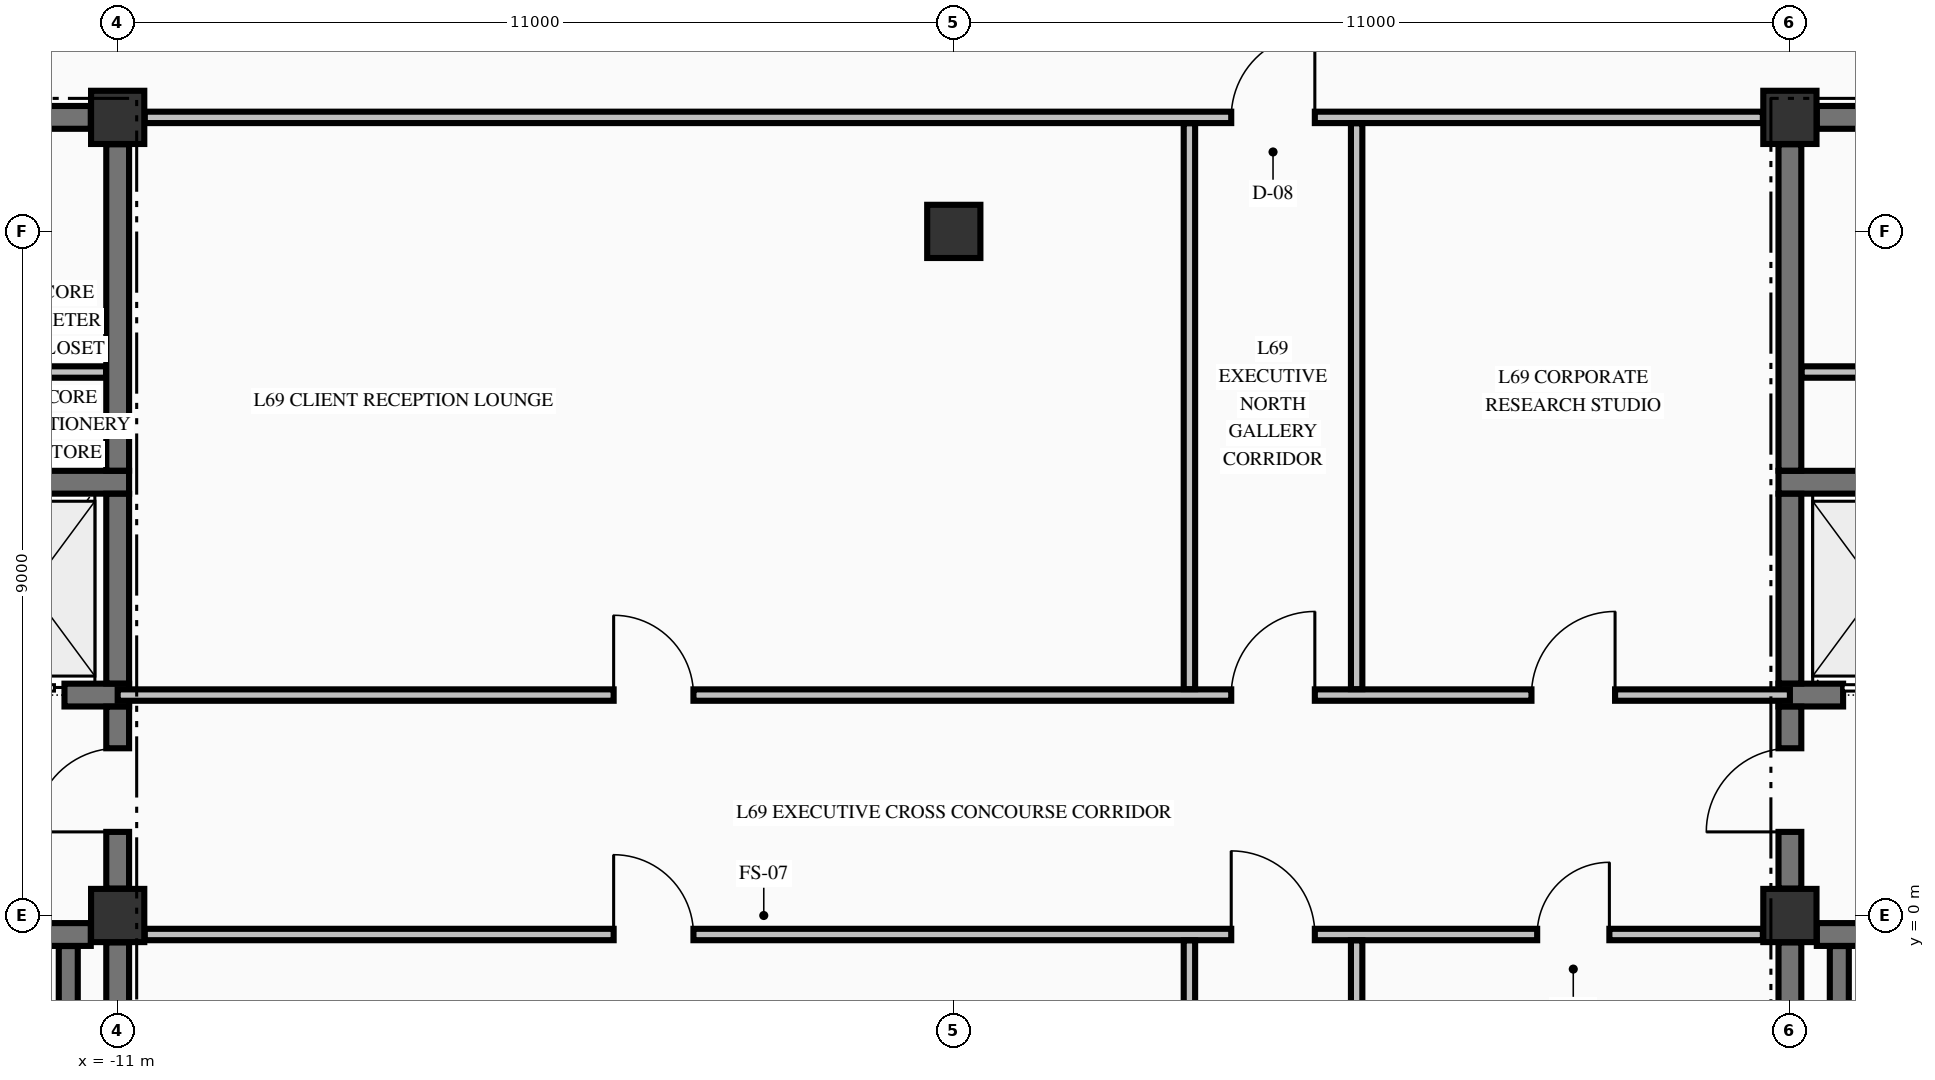
"""IFC4 building model, lengths in metres.
Left out: names, types, materials, properties, quantities, classifications, styles, units other than length and angle.
Written with IfcOpenShell. Run it as: python <this file> out.ifc"""

import sys

from ifc_helpers import new_model, si_unit, direction, frame, frame_2d, origin, origin_2d, place, context, subcontext, project, spatial, rectangle, extrude, element, fill, save


model = new_model("IFC4")
c1 = context("Model", 3, precision=1e-05, world=origin(), true_north=direction((0.0, 1.0)))
c2 = subcontext(c1, "Body", "Model", "MODEL_VIEW")
j1 = project(units=[si_unit("LENGTHUNIT", "METRE"), si_unit("PLANEANGLEUNIT", "RADIAN")], contexts=[c1])
p1 = place(None, origin())
s1 = spatial("IfcSite", under=j1, at=p1, CompositionType="ELEMENT")
p2 = place(p1, origin())
s2 = spatial("IfcBuilding", under=s1, at=p2, CompositionType="ELEMENT")
p3 = place(p2, frame((0.0, 0.0, 260.89)))
s3 = spatial("IfcBuildingStorey", under=s2, at=p3, CompositionType="ELEMENT", Elevation=260.89)
for number, where, z_axis, x_axis in (
    (1, (-11.0, 0.0, -0.25), (0.0, 0.0, 1.0), (1.0, 0.0, 0.0)),
    (2, (-11.0, 10.5, -0.25), (0.0, 0.0, 1.0), (1.0, 0.0, 0.0)),
    (3, (11.0, 0.0, -0.25), (0.0, 0.0, 1.0), (1.0, 0.0, 0.0)),
    (4, (11.0, 10.5, -0.25), (0.0, 0.0, 1.0), (1.0, 0.0, 0.0)),
    (5, (0.0, 9.0, -0.25), (0.0, 0.0, 1.0), (1.0, 0.0, 0.0)),
):
    element("IfcColumn", number, at=place(p3, frame(where, z_axis=z_axis, x_axis=x_axis)), inside=s3, PredefinedType="COLUMN", context=c2, shape_type="SweptSolid", body=[
        extrude(rectangle(XDim=0.7, YDim=0.7, at=origin_2d()), origin(), (0.0, 0.0, 1.0), 3.23),
    ])
p4 = place(p3, frame((-19.646, -0.25, 0.0), z_axis=(0.0, 0.0, 1.0), x_axis=(1.0, 0.0, 0.0)))
e6 = element("IfcWall", 6, at=p4, inside=s3, PredefinedType="SHEAR", context=c2, shape_type="SweptSolid", body=[
    extrude(rectangle(XDim=8.292, YDim=0.3, at=frame_2d((4.146, 0.0))), origin(), (0.0, 0.0, 1.0), 2.98),
])
p5 = place(p4, frame((5.946, 0.0, 0.0)))
e7 = element("IfcOpeningElement", 7, at=p5, cuts=e6, PredefinedType="OPENING", context=c2, shape_type="SweptSolid", body=[
    extrude(rectangle(XDim=1.1, YDim=2.15, at=frame_2d((0.55, 1.075))), frame((0.0, 0.16, 0.0), z_axis=(0.0, -1.0, 0.0), x_axis=(1.0, 0.0, 0.0)), (0.0, 0.0, 1.0), 0.32),
])
p6 = place(p3, frame((11.354, -0.25, 0.0), z_axis=(0.0, 0.0, 1.0), x_axis=(1.0, 0.0, 0.0)))
e8 = element("IfcWall", 8, at=p6, inside=s3, PredefinedType="SHEAR", context=c2, shape_type="SweptSolid", body=[
    extrude(rectangle(XDim=3.521, YDim=0.3, at=frame_2d((1.76, 0.0))), origin(), (0.0, 0.0, 1.0), 2.98),
])
p7 = place(p6, frame((1.246, 0.0, 0.0)))
e9 = element("IfcOpeningElement", 9, at=p7, cuts=e8, PredefinedType="OPENING", context=c2, shape_type="SweptSolid", body=[
    extrude(rectangle(XDim=1.1, YDim=2.15, at=frame_2d((0.55, 1.075))), frame((0.0, 0.16, 0.0), z_axis=(0.0, -1.0, 0.0), x_axis=(1.0, 0.0, 0.0)), (0.0, 0.0, 1.0), 0.32),
])
p8 = place(p3, frame((-14.875, 2.9, 0.0), z_axis=(0.0, 0.0, 1.0), x_axis=(1.0, 0.0, 0.0)))
e10 = element("IfcWall", 10, at=p8, inside=s3, PredefinedType="SHEAR", context=c2, shape_type="SweptSolid", body=[
    extrude(rectangle(XDim=4.025, YDim=0.3, at=frame_2d((2.012, 0.0))), origin(), (0.0, 0.0, 1.0), 2.98),
])
p9 = place(p8, frame((2.075, 0.0, 0.0)))
e11 = element("IfcOpeningElement", 11, at=p9, cuts=e10, PredefinedType="OPENING", context=c2, shape_type="SweptSolid", body=[
    extrude(rectangle(XDim=1.1, YDim=2.2, at=frame_2d((0.55, 1.1))), frame((0.0, 0.16, 0.0), z_axis=(0.0, -1.0, 0.0), x_axis=(1.0, 0.0, 0.0)), (0.0, 0.0, 1.0), 0.32),
])
p10 = place(p3, frame((10.85, 2.9, 0.0), z_axis=(0.0, 0.0, 1.0), x_axis=(1.0, 0.0, 0.0)))
e12 = element("IfcWall", 12, at=p10, inside=s3, PredefinedType="SHEAR", context=c2, shape_type="SweptSolid", body=[
    extrude(rectangle(XDim=4.025, YDim=0.3, at=frame_2d((2.012, 0.0))), origin(), (0.0, 0.0, 1.0), 2.98),
])
p11 = place(p10, frame((0.85, 0.0, 0.0)))
e13 = element("IfcOpeningElement", 13, at=p11, cuts=e12, PredefinedType="OPENING", context=c2, shape_type="SweptSolid", body=[
    extrude(rectangle(XDim=1.1, YDim=2.2, at=frame_2d((0.55, 1.1))), frame((0.0, 0.16, 0.0), z_axis=(0.0, -1.0, 0.0), x_axis=(1.0, 0.0, 0.0)), (0.0, 0.0, 1.0), 0.32),
])
for number, where, z_axis, x_axis in (
    (14, (-14.875, 5.7, 0.0), (0.0, 0.0, 1.0), (1.0, 0.0, 0.0)),
    (15, (10.85, 5.7, 0.0), (0.0, 0.0, 1.0), (1.0, 0.0, 0.0)),
):
    element("IfcWall", number, at=place(p3, frame(where, z_axis=z_axis, x_axis=x_axis)), inside=s3, PredefinedType="SHEAR", context=c2, shape_type="SweptSolid", body=[
        extrude(rectangle(XDim=4.025, YDim=0.3, at=frame_2d((2.012, 0.0))), origin(), (0.0, 0.0, 1.0), 2.98),
    ])
p12 = place(p3, frame((-14.7, 10.5, 0.0), z_axis=(0.0, 0.0, 1.0), x_axis=(1.0, 0.0, 0.0)))
e16 = element("IfcWall", 16, at=p12, inside=s3, PredefinedType="SHEAR", context=c2, shape_type="SweptSolid", body=[
    extrude(rectangle(XDim=3.346, YDim=0.3, at=frame_2d((1.673, 0.0))), origin(), (0.0, 0.0, 1.0), 2.98),
])
p13 = place(p12, frame((0.305, 0.0, 0.0)))
e17 = element("IfcOpeningElement", 17, at=p13, cuts=e16, PredefinedType="OPENING", context=c2, shape_type="SweptSolid", body=[
    extrude(rectangle(XDim=0.95, YDim=2.15, at=frame_2d((0.475, 1.075))), frame((0.0, 0.16, 0.0), z_axis=(0.0, -1.0, 0.0), x_axis=(1.0, 0.0, 0.0)), (0.0, 0.0, 1.0), 0.32),
])
p14 = place(p3, frame((11.354, 10.5, 0.0), z_axis=(0.0, 0.0, 1.0), x_axis=(1.0, 0.0, 0.0)))
e18 = element("IfcWall", 18, at=p14, inside=s3, PredefinedType="SHEAR", context=c2, shape_type="SweptSolid", body=[
    extrude(rectangle(XDim=3.346, YDim=0.3, at=frame_2d((1.673, 0.0))), origin(), (0.0, 0.0, 1.0), 2.98),
])
p15 = place(p14, frame((2.091, 0.0, 0.0)))
e19 = element("IfcOpeningElement", 19, at=p15, cuts=e18, PredefinedType="OPENING", context=c2, shape_type="SweptSolid", body=[
    extrude(rectangle(XDim=0.95, YDim=2.15, at=frame_2d((0.475, 1.075))), frame((0.0, 0.16, 0.0), z_axis=(0.0, -1.0, 0.0), x_axis=(1.0, 0.0, 0.0)), (0.0, 0.0, 1.0), 0.32),
])
p16 = place(p3, frame((-10.644, -0.25, 0.0), z_axis=(0.0, 0.0, 1.0), x_axis=(1.0, 0.0, 0.0)))
e20 = element("IfcWall", 20, at=p16, inside=s3, PredefinedType="PARTITIONING", context=c2, shape_type="SweptSolid", body=[
    extrude(rectangle(XDim=21.288, YDim=0.15, at=frame_2d((10.644, 0.0))), origin(), (0.0, 0.0, 1.0), 2.98),
])
p17 = place(p16, frame((14.294, 0.0, 0.0)))
e21 = element("IfcOpeningElement", 21, at=p17, cuts=e20, PredefinedType="OPENING", context=c2, shape_type="SweptSolid", body=[
    extrude(rectangle(XDim=1.1, YDim=2.15, at=frame_2d((0.55, 1.075))), frame((0.0, 0.085, 0.0), z_axis=(0.0, -1.0, 0.0), x_axis=(1.0, 0.0, 0.0)), (0.0, 0.0, 1.0), 0.17),
])
p18 = place(p16, frame((6.169, 0.0, 0.0)))
e22 = element("IfcOpeningElement", 22, at=p18, cuts=e20, PredefinedType="OPENING", context=c2, shape_type="SweptSolid", body=[
    extrude(rectangle(XDim=1.05, YDim=2.15, at=frame_2d((0.525, 1.075))), frame((0.0, 0.085, 0.0), z_axis=(0.0, -1.0, 0.0), x_axis=(1.0, 0.0, 0.0)), (0.0, 0.0, 1.0), 0.17),
])
p19 = place(p16, frame((18.319, 0.0, 0.0)))
e23 = element("IfcOpeningElement", 23, at=p19, cuts=e20, PredefinedType="OPENING", context=c2, shape_type="SweptSolid", body=[
    extrude(rectangle(XDim=0.95, YDim=2.15, at=frame_2d((0.475, 1.075))), frame((0.0, 0.085, 0.0), z_axis=(0.0, -1.0, 0.0), x_axis=(1.0, 0.0, 0.0)), (0.0, 0.0, 1.0), 0.17),
])
p20 = place(p3, frame((-11.0, 2.9, 0.0), z_axis=(0.0, 0.0, 1.0), x_axis=(1.0, 0.0, 0.0)))
e24 = element("IfcWall", 24, at=p20, inside=s3, PredefinedType="PARTITIONING", context=c2, shape_type="SweptSolid", body=[
    extrude(rectangle(XDim=22.0, YDim=0.15, at=frame_2d((11.0, 0.0))), origin(), (0.0, 0.0, 1.0), 2.98),
])
p21 = place(p20, frame((14.65, 0.0, 0.0)))
e25 = element("IfcOpeningElement", 25, at=p21, cuts=e24, PredefinedType="OPENING", context=c2, shape_type="SweptSolid", body=[
    extrude(rectangle(XDim=1.1, YDim=2.15, at=frame_2d((0.55, 1.075))), frame((0.0, 0.085, 0.0), z_axis=(0.0, -1.0, 0.0), x_axis=(1.0, 0.0, 0.0)), (0.0, 0.0, 1.0), 0.17),
])
p22 = place(p20, frame((6.525, 0.0, 0.0)))
e26 = element("IfcOpeningElement", 26, at=p22, cuts=e24, PredefinedType="OPENING", context=c2, shape_type="SweptSolid", body=[
    extrude(rectangle(XDim=1.05, YDim=2.15, at=frame_2d((0.525, 1.075))), frame((0.0, 0.085, 0.0), z_axis=(0.0, -1.0, 0.0), x_axis=(1.0, 0.0, 0.0)), (0.0, 0.0, 1.0), 0.17),
])
p23 = place(p20, frame((18.6, 0.0, 0.0)))
e27 = element("IfcOpeningElement", 27, at=p23, cuts=e24, PredefinedType="OPENING", context=c2, shape_type="SweptSolid", body=[
    extrude(rectangle(XDim=1.1, YDim=2.15, at=frame_2d((0.55, 1.075))), frame((0.0, 0.085, 0.0), z_axis=(0.0, -1.0, 0.0), x_axis=(1.0, 0.0, 0.0)), (0.0, 0.0, 1.0), 0.17),
])
for number, where, z_axis, x_axis in (
    (28, (-13.225, 7.15, 0.0), (0.0, 0.0, 1.0), (1.0, 0.0, 0.0)),
    (29, (11.153, 7.15, 0.0), (0.0, 0.0, 1.0), (1.0, 0.0, 0.0)),
):
    element("IfcWall", number, at=place(p3, frame(where, z_axis=z_axis, x_axis=x_axis)), inside=s3, PredefinedType="PARTITIONING", context=c2, shape_type="SweptSolid", body=[
        extrude(rectangle(XDim=2.072, YDim=0.15, at=frame_2d((1.036, 0.0))), origin(), (0.0, 0.0, 1.0), 2.98),
    ])
p24 = place(p3, frame((-10.644, 10.5, 0.0), z_axis=(0.0, 0.0, 1.0), x_axis=(1.0, 0.0, 0.0)))
e30 = element("IfcWall", 30, at=p24, inside=s3, PredefinedType="PARTITIONING", context=c2, shape_type="SweptSolid", body=[
    extrude(rectangle(XDim=21.288, YDim=0.15, at=frame_2d((10.644, 0.0))), origin(), (0.0, 0.0, 1.0), 2.98),
])
p25 = place(p24, frame((14.294, 0.0, 0.0)))
e31 = element("IfcOpeningElement", 31, at=p25, cuts=e30, PredefinedType="OPENING", context=c2, shape_type="SweptSolid", body=[
    extrude(rectangle(XDim=1.1, YDim=2.15, at=frame_2d((0.55, 1.075))), frame((0.0, 0.085, 0.0), z_axis=(0.0, -1.0, 0.0), x_axis=(1.0, 0.0, 0.0)), (0.0, 0.0, 1.0), 0.17),
])
p26 = place(p3, frame((-11.65, -9.798, 0.0), z_axis=(0.0, 0.0, 1.0), x_axis=(0.0, 1.0, 0.0)))
e32 = element("IfcWall", 32, at=p26, inside=s3, PredefinedType="SOLIDWALL", context=c2, shape_type="SweptSolid", body=[
    extrude(rectangle(XDim=9.396, YDim=0.25, at=frame_2d((4.698, 0.0))), origin(), (0.0, 0.0, 1.0), 2.98),
])
p27 = place(p3, frame((-11.0, -9.596, 0.0), z_axis=(0.0, 0.0, 1.0), x_axis=(0.0, 1.0, 0.0)))
e33 = element("IfcWall", 33, at=p27, inside=s3, PredefinedType="SHEAR", context=c2, shape_type="SweptSolid", body=[
    extrude(rectangle(XDim=9.242, YDim=0.3, at=frame_2d((4.621, 0.0))), origin(), (0.0, 0.0, 1.0), 2.98),
])
p28 = place(p3, frame((-11.0, 0.354, 0.0), z_axis=(0.0, 0.0, 1.0), x_axis=(0.0, 1.0, 0.0)))
e34 = element("IfcWall", 34, at=p28, inside=s3, PredefinedType="SHEAR", context=c2, shape_type="SweptSolid", body=[
    extrude(rectangle(XDim=2.394, YDim=0.3, at=frame_2d((1.197, 0.0))), origin(), (0.0, 0.0, 1.0), 2.98),
])
p29 = place(p28, frame((0.746, 0.0, 0.0)))
e35 = element("IfcOpeningElement", 35, at=p29, cuts=e34, PredefinedType="OPENING", context=c2, shape_type="SweptSolid", body=[
    extrude(rectangle(XDim=1.1, YDim=2.15, at=frame_2d((0.55, 1.075))), frame((0.0, 0.16, 0.0), z_axis=(0.0, -1.0, 0.0), x_axis=(1.0, 0.0, 0.0)), (0.0, 0.0, 1.0), 0.32),
])
p30 = place(p3, frame((-11.0, 3.052, 0.0), z_axis=(0.0, 0.0, 1.0), x_axis=(0.0, 1.0, 0.0)))
e36 = element("IfcWall", 36, at=p30, inside=s3, PredefinedType="SHEAR", context=c2, shape_type="SweptSolid", body=[
    extrude(rectangle(XDim=2.496, YDim=0.3, at=frame_2d((1.248, 0.0))), origin(), (0.0, 0.0, 1.0), 2.98),
])
p31 = place(p3, frame((-11.0, 5.852, 0.0), z_axis=(0.0, 0.0, 1.0), x_axis=(0.0, 1.0, 0.0)))
e37 = element("IfcWall", 37, at=p31, inside=s3, PredefinedType="SHEAR", context=c2, shape_type="SweptSolid", body=[
    extrude(rectangle(XDim=4.294, YDim=0.3, at=frame_2d((2.147, 0.0))), origin(), (0.0, 0.0, 1.0), 2.98),
])
p32 = place(p3, frame((11.0, -9.596, 0.0), z_axis=(0.0, 0.0, 1.0), x_axis=(0.0, 1.0, 0.0)))
e38 = element("IfcWall", 38, at=p32, inside=s3, PredefinedType="SHEAR", context=c2, shape_type="SweptSolid", body=[
    extrude(rectangle(XDim=9.242, YDim=0.3, at=frame_2d((4.621, 0.0))), origin(), (0.0, 0.0, 1.0), 2.98),
])
p33 = place(p3, frame((11.0, 0.354, 0.0), z_axis=(0.0, 0.0, 1.0), x_axis=(0.0, 1.0, 0.0)))
e39 = element("IfcWall", 39, at=p33, inside=s3, PredefinedType="SHEAR", context=c2, shape_type="SweptSolid", body=[
    extrude(rectangle(XDim=2.394, YDim=0.3, at=frame_2d((1.197, 0.0))), origin(), (0.0, 0.0, 1.0), 2.98),
])
p34 = place(p33, frame((0.746, 0.0, 0.0)))
e40 = element("IfcOpeningElement", 40, at=p34, cuts=e39, PredefinedType="OPENING", context=c2, shape_type="SweptSolid", body=[
    extrude(rectangle(XDim=1.1, YDim=2.15, at=frame_2d((0.55, 1.075))), frame((0.0, 0.16, 0.0), z_axis=(0.0, -1.0, 0.0), x_axis=(1.0, 0.0, 0.0)), (0.0, 0.0, 1.0), 0.32),
])
p35 = place(p3, frame((11.0, 3.052, 0.0), z_axis=(0.0, 0.0, 1.0), x_axis=(0.0, 1.0, 0.0)))
e41 = element("IfcWall", 41, at=p35, inside=s3, PredefinedType="SHEAR", context=c2, shape_type="SweptSolid", body=[
    extrude(rectangle(XDim=2.496, YDim=0.3, at=frame_2d((1.248, 0.0))), origin(), (0.0, 0.0, 1.0), 2.98),
])
p36 = place(p3, frame((11.0, 5.852, 0.0), z_axis=(0.0, 0.0, 1.0), x_axis=(0.0, 1.0, 0.0)))
e42 = element("IfcWall", 42, at=p36, inside=s3, PredefinedType="SHEAR", context=c2, shape_type="SweptSolid", body=[
    extrude(rectangle(XDim=4.294, YDim=0.3, at=frame_2d((2.147, 0.0))), origin(), (0.0, 0.0, 1.0), 2.98),
])
p37 = place(p3, frame((11.65, -9.798, 0.0), z_axis=(0.0, 0.0, 1.0), x_axis=(0.0, 1.0, 0.0)))
e43 = element("IfcWall", 43, at=p37, inside=s3, PredefinedType="SOLIDWALL", context=c2, shape_type="SweptSolid", body=[
    extrude(rectangle(XDim=9.396, YDim=0.25, at=frame_2d((4.698, 0.0))), origin(), (0.0, 0.0, 1.0), 2.98),
])
p38 = place(p3, frame((3.1, -9.872, 0.0), z_axis=(0.0, 0.0, 1.0), x_axis=(0.0, 1.0, 0.0)))
e44 = element("IfcWall", 44, at=p38, inside=s3, PredefinedType="PARTITIONING", context=c2, shape_type="SweptSolid", body=[
    extrude(rectangle(XDim=9.544, YDim=0.15, at=frame_2d((4.772, 0.0))), origin(), (0.0, 0.0, 1.0), 2.98),
])
p39 = place(p3, frame((3.1, 2.978, 0.0), z_axis=(0.0, 0.0, 1.0), x_axis=(0.0, 1.0, 0.0)))
e45 = element("IfcWall", 45, at=p39, inside=s3, PredefinedType="PARTITIONING", context=c2, shape_type="SweptSolid", body=[
    extrude(rectangle(XDim=7.444, YDim=0.15, at=frame_2d((3.722, 0.0))), origin(), (0.0, 0.0, 1.0), 2.98),
])
p40 = place(p3, frame((5.3, -4.747, 0.0), z_axis=(0.0, 0.0, 1.0), x_axis=(0.0, 1.0, 0.0)))
e46 = element("IfcWall", 46, at=p40, inside=s3, PredefinedType="PARTITIONING", context=c2, shape_type="SweptSolid", body=[
    extrude(rectangle(XDim=4.419, YDim=0.15, at=frame_2d((2.209, 0.0))), origin(), (0.0, 0.0, 1.0), 2.98),
])
p41 = place(p3, frame((5.3, 2.978, 0.0), z_axis=(0.0, 0.0, 1.0), x_axis=(0.0, 1.0, 0.0)))
e47 = element("IfcWall", 47, at=p41, inside=s3, PredefinedType="PARTITIONING", context=c2, shape_type="SweptSolid", body=[
    extrude(rectangle(XDim=7.444, YDim=0.15, at=frame_2d((3.722, 0.0))), origin(), (0.0, 0.0, 1.0), 2.98),
])
p42 = place(p29, origin())
e48 = element("IfcDoor", 48, at=p42, inside=s3, OperationType="SINGLE_SWING_LEFT", PredefinedType="DOOR", context=c2, shape_type="SweptSolid", body=[
    extrude(rectangle(XDim=1.1, YDim=2.15, at=frame_2d((0.55, 1.075))), frame((0.0, 0.025, 0.0), z_axis=(0.0, -1.0, 0.0), x_axis=(1.0, 0.0, 0.0)), (0.0, 0.0, 1.0), 0.05),
])
fill(e35, e48)
p43 = place(p9, origin())
e49 = element("IfcDoor", 49, at=p43, inside=s3, OperationType="SLIDING_TO_LEFT", PredefinedType="DOOR", context=c2, shape_type="SweptSolid", body=[
    extrude(rectangle(XDim=1.1, YDim=2.2, at=frame_2d((0.55, 1.1))), frame((0.0, 0.025, 0.0), z_axis=(0.0, -1.0, 0.0), x_axis=(1.0, 0.0, 0.0)), (0.0, 0.0, 1.0), 0.05),
])
fill(e11, e49)
p44 = place(p34, origin())
e50 = element("IfcDoor", 50, at=p44, inside=s3, OperationType="SINGLE_SWING_LEFT", PredefinedType="DOOR", context=c2, shape_type="SweptSolid", body=[
    extrude(rectangle(XDim=1.1, YDim=2.15, at=frame_2d((0.55, 1.075))), frame((0.0, 0.025, 0.0), z_axis=(0.0, -1.0, 0.0), x_axis=(1.0, 0.0, 0.0)), (0.0, 0.0, 1.0), 0.05),
])
fill(e40, e50)
p45 = place(p11, origin())
e51 = element("IfcDoor", 51, at=p45, inside=s3, OperationType="SLIDING_TO_RIGHT", PredefinedType="DOOR", context=c2, shape_type="SweptSolid", body=[
    extrude(rectangle(XDim=1.1, YDim=2.2, at=frame_2d((0.55, 1.1))), frame((0.0, 0.025, 0.0), z_axis=(0.0, -1.0, 0.0), x_axis=(1.0, 0.0, 0.0)), (0.0, 0.0, 1.0), 0.05),
])
fill(e13, e51)
p46 = place(p25, origin())
e52 = element("IfcDoor", 52, at=p46, inside=s3, OperationType="SINGLE_SWING_RIGHT", PredefinedType="DOOR", context=c2, shape_type="SweptSolid", body=[
    extrude(rectangle(XDim=1.1, YDim=2.15, at=frame_2d((0.55, 1.075))), frame((0.0, 0.025, 0.0), z_axis=(0.0, -1.0, 0.0), x_axis=(1.0, 0.0, 0.0)), (0.0, 0.0, 1.0), 0.05),
])
fill(e31, e52)
p47 = place(p21, origin())
e53 = element("IfcDoor", 53, at=p47, inside=s3, OperationType="SINGLE_SWING_RIGHT", PredefinedType="DOOR", context=c2, shape_type="SweptSolid", body=[
    extrude(rectangle(XDim=1.1, YDim=2.15, at=frame_2d((0.55, 1.075))), frame((0.0, 0.025, 0.0), z_axis=(0.0, -1.0, 0.0), x_axis=(1.0, 0.0, 0.0)), (0.0, 0.0, 1.0), 0.05),
])
fill(e25, e53)
p48 = place(p17, origin())
e54 = element("IfcDoor", 54, at=p48, inside=s3, OperationType="SINGLE_SWING_LEFT", PredefinedType="DOOR", context=c2, shape_type="SweptSolid", body=[
    extrude(rectangle(XDim=1.1, YDim=2.15, at=frame_2d((0.55, 1.075))), frame((0.0, 0.025, 0.0), z_axis=(0.0, -1.0, 0.0), x_axis=(1.0, 0.0, 0.0)), (0.0, 0.0, 1.0), 0.05),
])
fill(e21, e54)
p49 = place(p22, origin())
e55 = element("IfcDoor", 55, at=p49, inside=s3, OperationType="SINGLE_SWING_LEFT", PredefinedType="DOOR", context=c2, shape_type="SweptSolid", body=[
    extrude(rectangle(XDim=1.05, YDim=2.15, at=frame_2d((0.525, 1.075))), frame((0.0, 0.025, 0.0), z_axis=(0.0, -1.0, 0.0), x_axis=(1.0, 0.0, 0.0)), (0.0, 0.0, 1.0), 0.05),
])
fill(e26, e55)
p50 = place(p23, origin())
e56 = element("IfcDoor", 56, at=p50, inside=s3, OperationType="SINGLE_SWING_RIGHT", PredefinedType="DOOR", context=c2, shape_type="SweptSolid", body=[
    extrude(rectangle(XDim=1.1, YDim=2.15, at=frame_2d((0.55, 1.075))), frame((0.0, 0.025, 0.0), z_axis=(0.0, -1.0, 0.0), x_axis=(1.0, 0.0, 0.0)), (0.0, 0.0, 1.0), 0.05),
])
fill(e27, e56)
p51 = place(p18, origin())
e57 = element("IfcDoor", 57, at=p51, inside=s3, OperationType="SINGLE_SWING_LEFT", PredefinedType="DOOR", context=c2, shape_type="SweptSolid", body=[
    extrude(rectangle(XDim=1.05, YDim=2.15, at=frame_2d((0.525, 1.075))), frame((0.0, 0.025, 0.0), z_axis=(0.0, -1.0, 0.0), x_axis=(1.0, 0.0, 0.0)), (0.0, 0.0, 1.0), 0.05),
])
fill(e22, e57)
p52 = place(p19, origin())
e58 = element("IfcDoor", 58, at=p52, inside=s3, OperationType="SINGLE_SWING_RIGHT", PredefinedType="DOOR", context=c2, shape_type="SweptSolid", body=[
    extrude(rectangle(XDim=0.95, YDim=2.15, at=frame_2d((0.475, 1.075))), frame((0.0, 0.025, 0.0), z_axis=(0.0, -1.0, 0.0), x_axis=(1.0, 0.0, 0.0)), (0.0, 0.0, 1.0), 0.05),
])
fill(e23, e58)
save(model, sys.argv[1])
